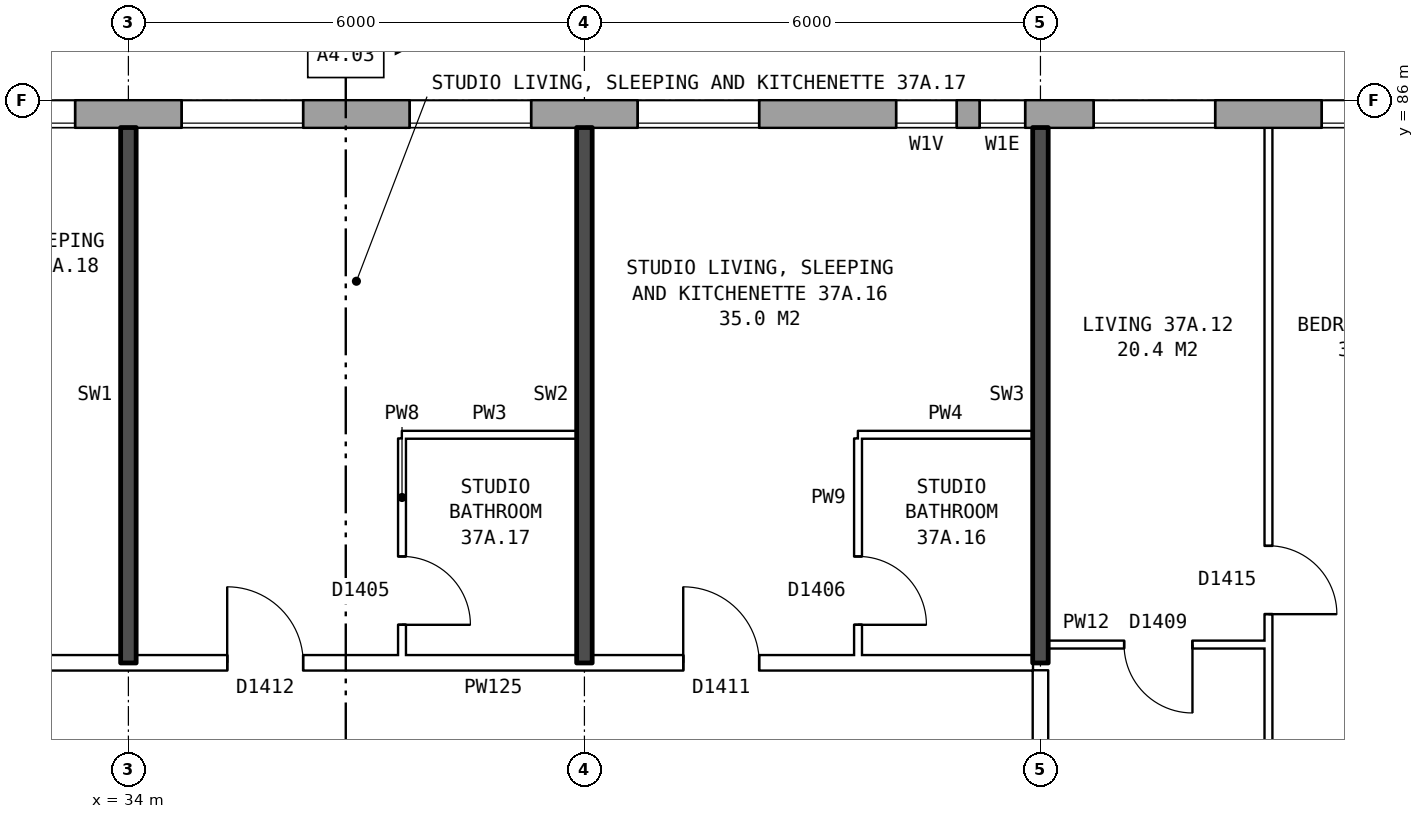
"""IFC4 building model, lengths in metres.
Left out: names, types, materials, properties, quantities, classifications, styles, units other than length and angle.
Written with IfcOpenShell. Run it as: python <this file> out.ifc"""

import sys

from ifc_helpers import new_model, si_unit, direction, frame, frame_2d, origin, place, context, subcontext, project, spatial, rectangle, extrude, element, fill, save


model = new_model("IFC4")
c1 = context("Model", 3, precision=1e-05, world=origin(), true_north=direction((0.0, 1.0)))
c2 = subcontext(c1, "Body", "Model", "MODEL_VIEW")
j1 = project(units=[si_unit("LENGTHUNIT", "METRE"), si_unit("PLANEANGLEUNIT", "RADIAN")], contexts=[c1])
p1 = place(None, origin())
s1 = spatial("IfcSite", under=j1, at=p1, CompositionType="ELEMENT")
p2 = place(p1, origin())
s2 = spatial("IfcBuilding", under=s1, at=p2, CompositionType="ELEMENT")
p3 = place(p2, frame((0.0, 0.0, 133.0)))
s3 = spatial("IfcBuildingStorey", under=s2, at=p3, CompositionType="ELEMENT", Elevation=133.0)
p4 = place(p3, frame((72.925, 85.82, 0.0), z_axis=(0.0, 0.0, 1.0), x_axis=(-1.0, 0.0, 0.0)))
e1 = element("IfcWall", 1, at=p4, inside=s3, PredefinedType="STANDARD", context=c2, shape_type="SweptSolid", body=[
    extrude(rectangle(XDim=43.101, YDim=0.36, at=frame_2d((21.55, 0.0))), origin(), (0.0, 0.0, 1.0), 2.85),
])
p5 = place(p4, frame((0.625, 0.0, 0.8)))
e2 = element("IfcOpeningElement", 2, at=p5, cuts=e1, PredefinedType="OPENING", context=c2, shape_type="SweptSolid", body=[
    extrude(rectangle(XDim=1.6, YDim=1.8, at=frame_2d((0.8, 0.9))), frame((0.0, 0.19, 0.0), z_axis=(0.0, -1.0, 0.0), x_axis=(1.0, 0.0, 0.0)), (0.0, 0.0, 1.0), 0.38),
])
p6 = place(p4, frame((3.625, 0.0, 0.8)))
e3 = element("IfcOpeningElement", 3, at=p6, cuts=e1, PredefinedType="OPENING", context=c2, shape_type="SweptSolid", body=[
    extrude(rectangle(XDim=1.6, YDim=1.8, at=frame_2d((0.8, 0.9))), frame((0.0, 0.19, 0.0), z_axis=(0.0, -1.0, 0.0), x_axis=(1.0, 0.0, 0.0)), (0.0, 0.0, 1.0), 0.38),
])
p7 = place(p4, frame((6.625, 0.0, 0.8)))
e4 = element("IfcOpeningElement", 4, at=p7, cuts=e1, PredefinedType="OPENING", context=c2, shape_type="SweptSolid", body=[
    extrude(rectangle(XDim=1.6, YDim=1.8, at=frame_2d((0.8, 0.9))), frame((0.0, 0.19, 0.0), z_axis=(0.0, -1.0, 0.0), x_axis=(1.0, 0.0, 0.0)), (0.0, 0.0, 1.0), 0.38),
])
p8 = place(p4, frame((9.625, 0.0, 0.8)))
e5 = element("IfcOpeningElement", 5, at=p8, cuts=e1, PredefinedType="OPENING", context=c2, shape_type="SweptSolid", body=[
    extrude(rectangle(XDim=1.6, YDim=1.8, at=frame_2d((0.8, 0.9))), frame((0.0, 0.19, 0.0), z_axis=(0.0, -1.0, 0.0), x_axis=(1.0, 0.0, 0.0)), (0.0, 0.0, 1.0), 0.38),
])
p9 = place(p4, frame((12.075, 0.0, 1.65)))
e6 = element("IfcOpeningElement", 6, at=p9, cuts=e1, PredefinedType="OPENING", context=c2, shape_type="SweptSolid", body=[
    extrude(rectangle(XDim=1.0, YDim=0.9, at=frame_2d((0.5, 0.45))), frame((0.0, 0.19, 0.0), z_axis=(0.0, -1.0, 0.0), x_axis=(1.0, 0.0, 0.0)), (0.0, 0.0, 1.0), 0.38),
])
p10 = place(p4, frame((15.625, 0.0, 0.8)))
e7 = element("IfcOpeningElement", 7, at=p10, cuts=e1, PredefinedType="OPENING", context=c2, shape_type="SweptSolid", body=[
    extrude(rectangle(XDim=1.6, YDim=1.8, at=frame_2d((0.8, 0.9))), frame((0.0, 0.19, 0.0), z_axis=(0.0, -1.0, 0.0), x_axis=(1.0, 0.0, 0.0)), (0.0, 0.0, 1.0), 0.38),
])
p11 = place(p4, frame((18.625, 0.0, 0.8)))
e8 = element("IfcOpeningElement", 8, at=p11, cuts=e1, PredefinedType="OPENING", context=c2, shape_type="SweptSolid", body=[
    extrude(rectangle(XDim=1.6, YDim=1.8, at=frame_2d((0.8, 0.9))), frame((0.0, 0.19, 0.0), z_axis=(0.0, -1.0, 0.0), x_axis=(1.0, 0.0, 0.0)), (0.0, 0.0, 1.0), 0.38),
])
p12 = place(p4, frame((21.625, 0.0, 0.8)))
e9 = element("IfcOpeningElement", 9, at=p12, cuts=e1, PredefinedType="OPENING", context=c2, shape_type="SweptSolid", body=[
    extrude(rectangle(XDim=1.6, YDim=1.8, at=frame_2d((0.8, 0.9))), frame((0.0, 0.19, 0.0), z_axis=(0.0, -1.0, 0.0), x_axis=(1.0, 0.0, 0.0)), (0.0, 0.0, 1.0), 0.38),
])
p13 = place(p4, frame((24.625, 0.0, 0.8)))
e10 = element("IfcOpeningElement", 10, at=p13, cuts=e1, PredefinedType="OPENING", context=c2, shape_type="SweptSolid", body=[
    extrude(rectangle(XDim=1.6, YDim=1.8, at=frame_2d((0.8, 0.9))), frame((0.0, 0.19, 0.0), z_axis=(0.0, -1.0, 0.0), x_axis=(1.0, 0.0, 0.0)), (0.0, 0.0, 1.0), 0.38),
])
p14 = place(p4, frame((27.125, 0.0, 0.8)))
e11 = element("IfcOpeningElement", 11, at=p14, cuts=e1, PredefinedType="OPENING", context=c2, shape_type="SweptSolid", body=[
    extrude(rectangle(XDim=0.6, YDim=1.8, at=frame_2d((0.3, 0.9))), frame((0.0, 0.19, 0.0), z_axis=(0.0, -1.0, 0.0), x_axis=(1.0, 0.0, 0.0)), (0.0, 0.0, 1.0), 0.38),
])
p15 = place(p4, frame((30.625, 0.0, 0.8)))
e12 = element("IfcOpeningElement", 12, at=p15, cuts=e1, PredefinedType="OPENING", context=c2, shape_type="SweptSolid", body=[
    extrude(rectangle(XDim=1.6, YDim=1.8, at=frame_2d((0.8, 0.9))), frame((0.0, 0.19, 0.0), z_axis=(0.0, -1.0, 0.0), x_axis=(1.0, 0.0, 0.0)), (0.0, 0.0, 1.0), 0.38),
])
p16 = place(p4, frame((33.625, 0.0, 0.8)))
e13 = element("IfcOpeningElement", 13, at=p16, cuts=e1, PredefinedType="OPENING", context=c2, shape_type="SweptSolid", body=[
    extrude(rectangle(XDim=1.6, YDim=1.8, at=frame_2d((0.8, 0.9))), frame((0.0, 0.19, 0.0), z_axis=(0.0, -1.0, 0.0), x_axis=(1.0, 0.0, 0.0)), (0.0, 0.0, 1.0), 0.38),
])
p17 = place(p4, frame((36.625, 0.0, 0.8)))
e14 = element("IfcOpeningElement", 14, at=p17, cuts=e1, PredefinedType="OPENING", context=c2, shape_type="SweptSolid", body=[
    extrude(rectangle(XDim=1.6, YDim=1.8, at=frame_2d((0.8, 0.9))), frame((0.0, 0.19, 0.0), z_axis=(0.0, -1.0, 0.0), x_axis=(1.0, 0.0, 0.0)), (0.0, 0.0, 1.0), 0.38),
])
p18 = place(p4, frame((39.625, 0.0, 0.8)))
e15 = element("IfcOpeningElement", 15, at=p18, cuts=e1, PredefinedType="OPENING", context=c2, shape_type="SweptSolid", body=[
    extrude(rectangle(XDim=1.6, YDim=1.8, at=frame_2d((0.8, 0.9))), frame((0.0, 0.19, 0.0), z_axis=(0.0, -1.0, 0.0), x_axis=(1.0, 0.0, 0.0)), (0.0, 0.0, 1.0), 0.38),
])
p19 = place(p4, frame((13.875, 0.0, 0.15)))
e16 = element("IfcOpeningElement", 16, at=p19, cuts=e1, PredefinedType="OPENING", context=c2, shape_type="SweptSolid", body=[
    extrude(rectangle(XDim=0.8, YDim=1.2, at=frame_2d((0.4, 0.6))), frame((0.0, 0.19, 0.0), z_axis=(0.0, -1.0, 0.0), x_axis=(1.0, 0.0, 0.0)), (0.0, 0.0, 1.0), 0.38),
])
p20 = place(p4, frame((28.025, 0.0, 0.8)))
e17 = element("IfcOpeningElement", 17, at=p20, cuts=e1, PredefinedType="OPENING", context=c2, shape_type="SweptSolid", body=[
    extrude(rectangle(XDim=0.8, YDim=0.9, at=frame_2d((0.4, 0.45))), frame((0.0, 0.19, 0.0), z_axis=(0.0, -1.0, 0.0), x_axis=(1.0, 0.0, 0.0)), (0.0, 0.0, 1.0), 0.38),
])
p21 = place(p3, frame((27.11, 78.6, 0.0), z_axis=(0.0, 0.0, 1.0), x_axis=(1.0, 0.0, 0.0)))
e18 = element("IfcWall", 18, at=p21, inside=s3, PredefinedType="PARTITIONING", context=c2, shape_type="SweptSolid", body=[
    extrude(rectangle(XDim=18.79, YDim=0.2, at=frame_2d((9.395, 0.0))), origin(), (0.0, 0.0, 1.0), 2.85),
])
p22 = place(p21, frame((14.19, 0.0, 0.0)))
e19 = element("IfcOpeningElement", 19, at=p22, cuts=e18, PredefinedType="OPENING", context=c2, shape_type="SweptSolid", body=[
    extrude(rectangle(XDim=1.0, YDim=2.1, at=frame_2d((0.5, 1.05))), frame((0.0, 0.11, 0.0), z_axis=(0.0, -1.0, 0.0), x_axis=(1.0, 0.0, 0.0)), (0.0, 0.0, 1.0), 0.22),
])
p23 = place(p21, frame((8.19, 0.0, 0.0)))
e20 = element("IfcOpeningElement", 20, at=p23, cuts=e18, PredefinedType="OPENING", context=c2, shape_type="SweptSolid", body=[
    extrude(rectangle(XDim=1.0, YDim=2.1, at=frame_2d((0.5, 1.05))), frame((0.0, 0.11, 0.0), z_axis=(0.0, -1.0, 0.0), x_axis=(1.0, 0.0, 0.0)), (0.0, 0.0, 1.0), 0.22),
])
p24 = place(p21, frame((4.59, 0.0, 0.0)))
e21 = element("IfcOpeningElement", 21, at=p24, cuts=e18, PredefinedType="OPENING", context=c2, shape_type="SweptSolid", body=[
    extrude(rectangle(XDim=1.0, YDim=2.1, at=frame_2d((0.5, 1.05))), frame((0.0, 0.11, 0.0), z_axis=(0.0, -1.0, 0.0), x_axis=(1.0, 0.0, 0.0)), (0.0, 0.0, 1.0), 0.22),
])
p25 = place(p3, frame((46.1, 78.84, 0.0), z_axis=(0.0, 0.0, 1.0), x_axis=(1.0, 0.0, 0.0)))
e22 = element("IfcWall", 22, at=p25, inside=s3, PredefinedType="PARTITIONING", context=c2, shape_type="SweptSolid", body=[
    extrude(rectangle(XDim=2.9, YDim=0.1, at=frame_2d((1.45, 0.0))), origin(), (0.0, 0.0, 1.0), 2.85),
])
p26 = place(p25, frame((1.0, 0.0, 0.0)))
e23 = element("IfcOpeningElement", 23, at=p26, cuts=e22, PredefinedType="OPENING", context=c2, shape_type="SweptSolid", body=[
    extrude(rectangle(XDim=0.9, YDim=2.1, at=frame_2d((0.45, 1.05))), frame((0.0, 0.06, 0.0), z_axis=(0.0, -1.0, 0.0), x_axis=(1.0, 0.0, 0.0)), (0.0, 0.0, 1.0), 0.12),
])
for number, where, z_axis, x_axis in (
    (24, (37.6, 81.6, 0.0), (0.0, 0.0, 1.0), (1.0, 0.0, 0.0)),
    (25, (43.6, 81.6, 0.0), (0.0, 0.0, 1.0), (1.0, 0.0, 0.0)),
):
    element("IfcWall", number, at=place(p3, frame(where, z_axis=z_axis, x_axis=x_axis)), inside=s3, PredefinedType="PARTITIONING", context=c2, shape_type="SweptSolid", body=[
        extrude(rectangle(XDim=2.3, YDim=0.1, at=frame_2d((1.15, 0.0))), origin(), (0.0, 0.0, 1.0), 2.85),
    ])
p27 = place(p3, frame((34.0, 78.6, 0.0), z_axis=(0.0, 0.0, 1.0), x_axis=(0.0, 1.0, 0.0)))
e26 = element("IfcWall", 26, at=p27, inside=s3, PredefinedType="SOLIDWALL", context=c2, shape_type="SweptSolid", body=[
    extrude(rectangle(XDim=7.04, YDim=0.2, at=frame_2d((3.52, 0.0))), origin(), (0.0, 0.0, 1.0), 2.85),
])
p28 = place(p3, frame((37.6, 78.7, 0.0), z_axis=(0.0, 0.0, 1.0), x_axis=(0.0, 1.0, 0.0)))
e27 = element("IfcWall", 27, at=p28, inside=s3, PredefinedType="PARTITIONING", context=c2, shape_type="SweptSolid", body=[
    extrude(rectangle(XDim=2.85, YDim=0.1, at=frame_2d((1.425, 0.0))), origin(), (0.0, 0.0, 1.0), 2.85),
])
p29 = place(p28, frame((0.4, 0.0, 0.0)))
e28 = element("IfcOpeningElement", 28, at=p29, cuts=e27, PredefinedType="OPENING", context=c2, shape_type="SweptSolid", body=[
    extrude(rectangle(XDim=0.9, YDim=2.1, at=frame_2d((0.45, 1.05))), frame((0.0, 0.06, 0.0), z_axis=(0.0, -1.0, 0.0), x_axis=(1.0, 0.0, 0.0)), (0.0, 0.0, 1.0), 0.12),
])
p30 = place(p3, frame((40.0, 78.6, 0.0), z_axis=(0.0, 0.0, 1.0), x_axis=(0.0, 1.0, 0.0)))
e29 = element("IfcWall", 29, at=p30, inside=s3, PredefinedType="SOLIDWALL", context=c2, shape_type="SweptSolid", body=[
    extrude(rectangle(XDim=7.04, YDim=0.2, at=frame_2d((3.52, 0.0))), origin(), (0.0, 0.0, 1.0), 2.85),
])
p31 = place(p3, frame((43.6, 78.7, 0.0), z_axis=(0.0, 0.0, 1.0), x_axis=(0.0, 1.0, 0.0)))
e30 = element("IfcWall", 30, at=p31, inside=s3, PredefinedType="PARTITIONING", context=c2, shape_type="SweptSolid", body=[
    extrude(rectangle(XDim=2.85, YDim=0.1, at=frame_2d((1.425, 0.0))), origin(), (0.0, 0.0, 1.0), 2.85),
])
p32 = place(p31, frame((0.4, 0.0, 0.0)))
e31 = element("IfcOpeningElement", 31, at=p32, cuts=e30, PredefinedType="OPENING", context=c2, shape_type="SweptSolid", body=[
    extrude(rectangle(XDim=0.9, YDim=2.1, at=frame_2d((0.45, 1.05))), frame((0.0, 0.06, 0.0), z_axis=(0.0, -1.0, 0.0), x_axis=(1.0, 0.0, 0.0)), (0.0, 0.0, 1.0), 0.12),
])
p33 = place(p3, frame((46.0, 76.3, 0.0), z_axis=(0.0, 0.0, 1.0), x_axis=(0.0, 1.0, 0.0)))
e32 = element("IfcWall", 32, at=p33, inside=s3, PredefinedType="PARTITIONING", context=c2, shape_type="SweptSolid", body=[
    extrude(rectangle(XDim=2.2, YDim=0.2, at=frame_2d((1.1, 0.0))), origin(), (0.0, 0.0, 1.0), 2.85),
])
p34 = place(p3, frame((46.0, 78.6, 0.0), z_axis=(0.0, 0.0, 1.0), x_axis=(0.0, 1.0, 0.0)))
e33 = element("IfcWall", 33, at=p34, inside=s3, PredefinedType="SOLIDWALL", context=c2, shape_type="SweptSolid", body=[
    extrude(rectangle(XDim=7.04, YDim=0.2, at=frame_2d((3.52, 0.0))), origin(), (0.0, 0.0, 1.0), 2.85),
])
p35 = place(p3, frame((49.0, 71.3, 0.0), z_axis=(0.0, 0.0, 1.0), x_axis=(0.0, 1.0, 0.0)))
e34 = element("IfcWall", 34, at=p35, inside=s3, PredefinedType="PARTITIONING", context=c2, shape_type="SweptSolid", body=[
    extrude(rectangle(XDim=14.34, YDim=0.1, at=frame_2d((7.17, 0.0))), origin(), (0.0, 0.0, 1.0), 2.85),
])
p36 = place(p35, frame((7.94, 0.0, 0.0)))
e35 = element("IfcOpeningElement", 35, at=p36, cuts=e34, PredefinedType="OPENING", context=c2, shape_type="SweptSolid", body=[
    extrude(rectangle(XDim=0.9, YDim=2.1, at=frame_2d((0.45, 1.05))), frame((0.0, 0.06, 0.0), z_axis=(0.0, -1.0, 0.0), x_axis=(1.0, 0.0, 0.0)), (0.0, 0.0, 1.0), 0.12),
])
p37 = place(p35, frame((0.4, 0.0, 0.0)))
e36 = element("IfcOpeningElement", 36, at=p37, cuts=e34, PredefinedType="OPENING", context=c2, shape_type="SweptSolid", body=[
    extrude(rectangle(XDim=0.9, YDim=2.1, at=frame_2d((0.45, 1.05))), frame((0.0, 0.06, 0.0), z_axis=(0.0, -1.0, 0.0), x_axis=(1.0, 0.0, 0.0)), (0.0, 0.0, 1.0), 0.12),
])
p38 = place(p12, origin())
e37 = element("IfcWindow", 37, at=p38, inside=s3, PartitioningType="SINGLE_PANEL", PredefinedType="WINDOW", context=c2, shape_type="SweptSolid", body=[
    extrude(rectangle(XDim=1.6, YDim=1.8, at=frame_2d((0.8, 0.9))), frame((0.0, 0.15, 0.0), z_axis=(0.0, -1.0, 0.0), x_axis=(1.0, 0.0, 0.0)), (0.0, 0.0, 1.0), 0.06),
])
fill(e9, e37)
p39 = place(p13, origin())
e38 = element("IfcWindow", 38, at=p39, inside=s3, PartitioningType="SINGLE_PANEL", PredefinedType="WINDOW", context=c2, shape_type="SweptSolid", body=[
    extrude(rectangle(XDim=1.6, YDim=1.8, at=frame_2d((0.8, 0.9))), frame((0.0, 0.15, 0.0), z_axis=(0.0, -1.0, 0.0), x_axis=(1.0, 0.0, 0.0)), (0.0, 0.0, 1.0), 0.06),
])
fill(e10, e38)
p40 = place(p14, origin())
e39 = element("IfcWindow", 39, at=p40, inside=s3, PartitioningType="SINGLE_PANEL", PredefinedType="WINDOW", context=c2, shape_type="SweptSolid", body=[
    extrude(rectangle(XDim=0.6, YDim=1.8, at=frame_2d((0.3, 0.9))), frame((0.0, 0.15, 0.0), z_axis=(0.0, -1.0, 0.0), x_axis=(1.0, 0.0, 0.0)), (0.0, 0.0, 1.0), 0.06),
])
fill(e11, e39)
p41 = place(p15, origin())
e40 = element("IfcWindow", 40, at=p41, inside=s3, PartitioningType="SINGLE_PANEL", PredefinedType="WINDOW", context=c2, shape_type="SweptSolid", body=[
    extrude(rectangle(XDim=1.6, YDim=1.8, at=frame_2d((0.8, 0.9))), frame((0.0, 0.15, 0.0), z_axis=(0.0, -1.0, 0.0), x_axis=(1.0, 0.0, 0.0)), (0.0, 0.0, 1.0), 0.06),
])
fill(e12, e40)
p42 = place(p16, origin())
e41 = element("IfcWindow", 41, at=p42, inside=s3, PartitioningType="SINGLE_PANEL", PredefinedType="WINDOW", context=c2, shape_type="SweptSolid", body=[
    extrude(rectangle(XDim=1.6, YDim=1.8, at=frame_2d((0.8, 0.9))), frame((0.0, 0.15, 0.0), z_axis=(0.0, -1.0, 0.0), x_axis=(1.0, 0.0, 0.0)), (0.0, 0.0, 1.0), 0.06),
])
fill(e13, e41)
p43 = place(p17, origin())
e42 = element("IfcWindow", 42, at=p43, inside=s3, PartitioningType="SINGLE_PANEL", PredefinedType="WINDOW", context=c2, shape_type="SweptSolid", body=[
    extrude(rectangle(XDim=1.6, YDim=1.8, at=frame_2d((0.8, 0.9))), frame((0.0, 0.15, 0.0), z_axis=(0.0, -1.0, 0.0), x_axis=(1.0, 0.0, 0.0)), (0.0, 0.0, 1.0), 0.06),
])
fill(e14, e42)
p44 = place(p18, origin())
e43 = element("IfcWindow", 43, at=p44, inside=s3, PartitioningType="SINGLE_PANEL", PredefinedType="WINDOW", context=c2, shape_type="SweptSolid", body=[
    extrude(rectangle(XDim=1.6, YDim=1.8, at=frame_2d((0.8, 0.9))), frame((0.0, 0.15, 0.0), z_axis=(0.0, -1.0, 0.0), x_axis=(1.0, 0.0, 0.0)), (0.0, 0.0, 1.0), 0.06),
])
fill(e15, e43)
p45 = place(p36, frame((0.9, 0.0, 0.0), z_axis=(0.0, 0.0, 1.0), x_axis=(-1.0, 0.0, 0.0)))
e44 = element("IfcDoor", 44, at=p45, inside=s3, OperationType="SINGLE_SWING_RIGHT", PredefinedType="DOOR", context=c2, shape_type="SweptSolid", body=[
    extrude(rectangle(XDim=0.9, YDim=2.1, at=frame_2d((0.45, 1.05))), frame((0.0, 0.025, 0.0), z_axis=(0.0, -1.0, 0.0), x_axis=(1.0, 0.0, 0.0)), (0.0, 0.0, 1.0), 0.05),
])
fill(e35, e44)
p46 = place(p26, frame((0.9, 0.0, 0.0), z_axis=(0.0, 0.0, 1.0), x_axis=(-1.0, 0.0, 0.0)))
e45 = element("IfcDoor", 45, at=p46, inside=s3, OperationType="SINGLE_SWING_LEFT", PredefinedType="DOOR", context=c2, shape_type="SweptSolid", body=[
    extrude(rectangle(XDim=0.9, YDim=2.1, at=frame_2d((0.45, 1.05))), frame((0.0, 0.025, 0.0), z_axis=(0.0, -1.0, 0.0), x_axis=(1.0, 0.0, 0.0)), (0.0, 0.0, 1.0), 0.05),
])
fill(e23, e45)
p47 = place(p22, origin())
e46 = element("IfcDoor", 46, at=p47, inside=s3, OperationType="SINGLE_SWING_LEFT", PredefinedType="DOOR", context=c2, shape_type="SweptSolid", body=[
    extrude(rectangle(XDim=1.0, YDim=2.1, at=frame_2d((0.5, 1.05))), frame((0.0, 0.025, 0.0), z_axis=(0.0, -1.0, 0.0), x_axis=(1.0, 0.0, 0.0)), (0.0, 0.0, 1.0), 0.05),
])
fill(e19, e46)
p48 = place(p32, frame((0.9, 0.0, 0.0), z_axis=(0.0, 0.0, 1.0), x_axis=(-1.0, 0.0, 0.0)))
e47 = element("IfcDoor", 47, at=p48, inside=s3, OperationType="SINGLE_SWING_RIGHT", PredefinedType="DOOR", context=c2, shape_type="SweptSolid", body=[
    extrude(rectangle(XDim=0.9, YDim=2.1, at=frame_2d((0.45, 1.05))), frame((0.0, 0.025, 0.0), z_axis=(0.0, -1.0, 0.0), x_axis=(1.0, 0.0, 0.0)), (0.0, 0.0, 1.0), 0.05),
])
fill(e31, e47)
p49 = place(p23, origin())
e48 = element("IfcDoor", 48, at=p49, inside=s3, OperationType="SINGLE_SWING_LEFT", PredefinedType="DOOR", context=c2, shape_type="SweptSolid", body=[
    extrude(rectangle(XDim=1.0, YDim=2.1, at=frame_2d((0.5, 1.05))), frame((0.0, 0.025, 0.0), z_axis=(0.0, -1.0, 0.0), x_axis=(1.0, 0.0, 0.0)), (0.0, 0.0, 1.0), 0.05),
])
fill(e20, e48)
p50 = place(p29, frame((0.9, 0.0, 0.0), z_axis=(0.0, 0.0, 1.0), x_axis=(-1.0, 0.0, 0.0)))
e49 = element("IfcDoor", 49, at=p50, inside=s3, OperationType="SINGLE_SWING_RIGHT", PredefinedType="DOOR", context=c2, shape_type="SweptSolid", body=[
    extrude(rectangle(XDim=0.9, YDim=2.1, at=frame_2d((0.45, 1.05))), frame((0.0, 0.025, 0.0), z_axis=(0.0, -1.0, 0.0), x_axis=(1.0, 0.0, 0.0)), (0.0, 0.0, 1.0), 0.05),
])
fill(e28, e49)
p51 = place(p20, origin())
e50 = element("IfcWindow", 50, at=p51, inside=s3, PartitioningType="SINGLE_PANEL", PredefinedType="WINDOW", context=c2, shape_type="SweptSolid", body=[
    extrude(rectangle(XDim=0.8, YDim=0.9, at=frame_2d((0.4, 0.45))), frame((0.0, 0.15, 0.0), z_axis=(0.0, -1.0, 0.0), x_axis=(1.0, 0.0, 0.0)), (0.0, 0.0, 1.0), 0.06),
])
fill(e17, e50)
save(model, sys.argv[1])
